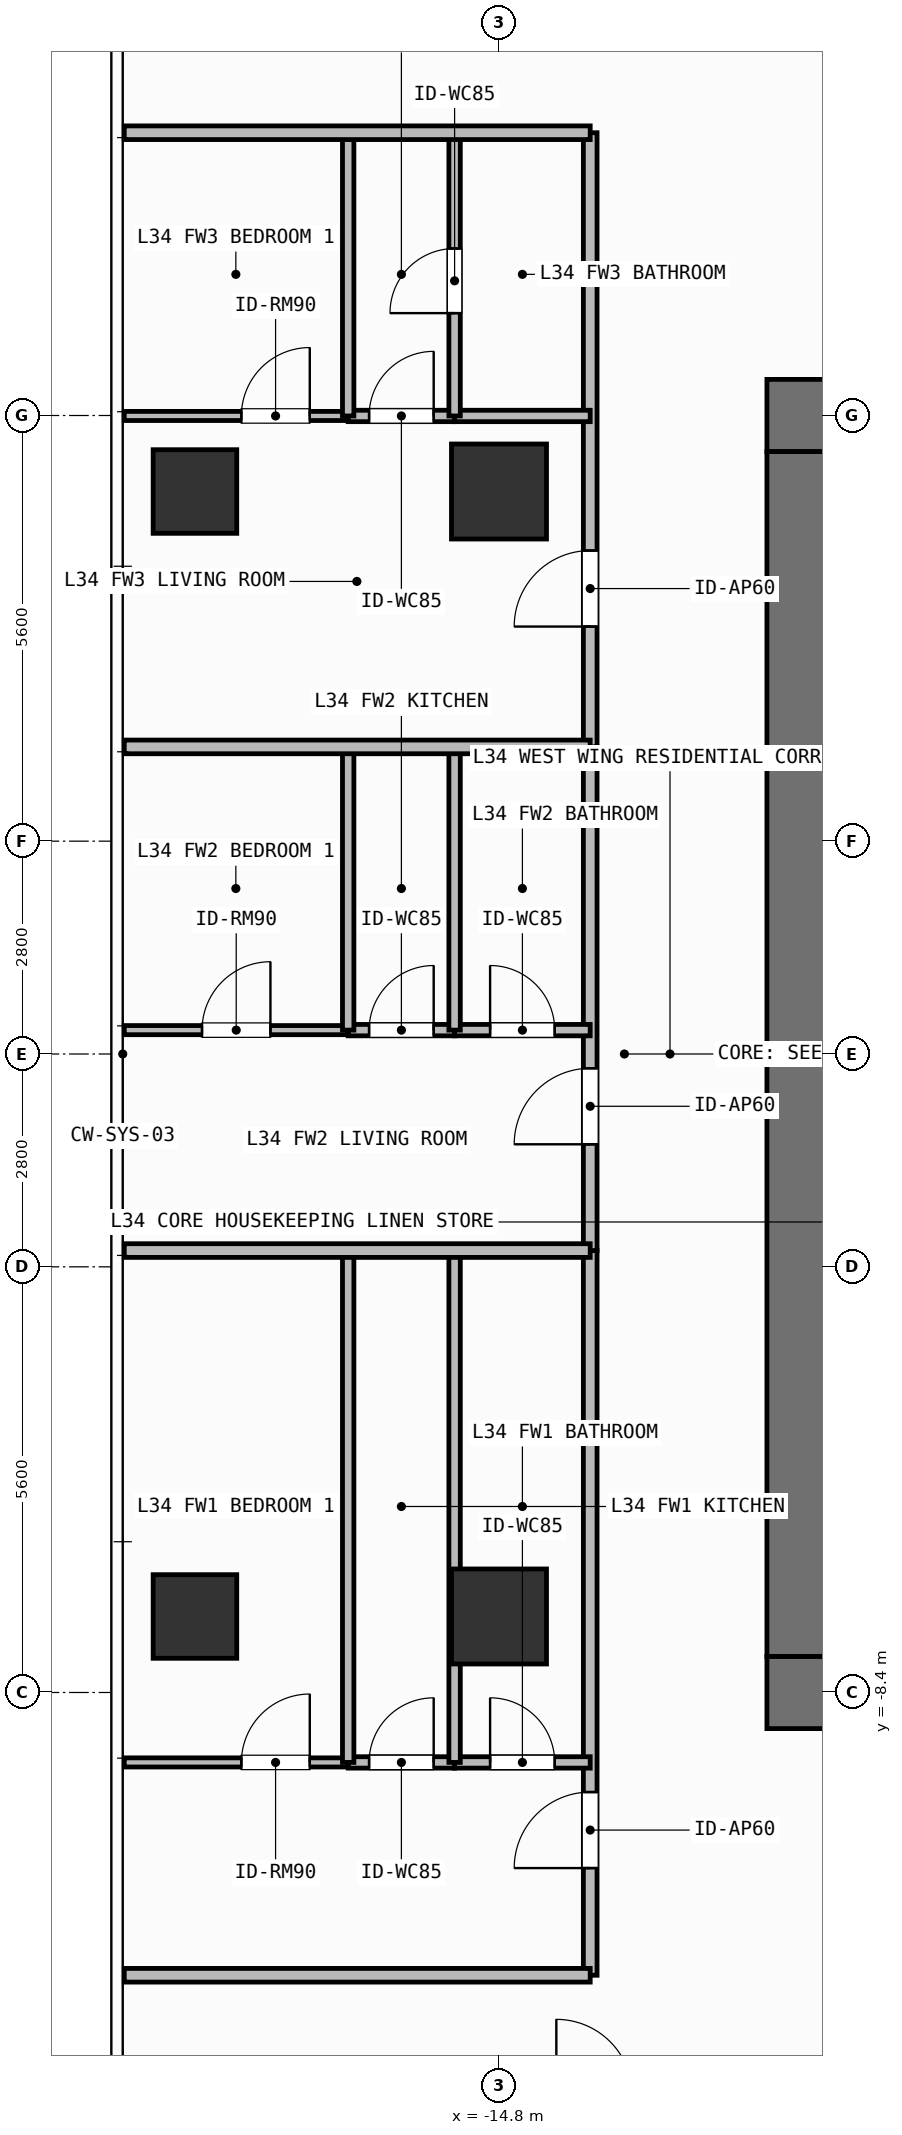
"""IFC4 building model, lengths in metres.
Left out: names, types, materials, properties, quantities, classifications, styles, units other than length and angle.
Written with IfcOpenShell. Run it as: python <this file> out.ifc"""

import sys

from ifc_helpers import new_model, si_unit, direction, frame, frame_2d, origin, origin_2d, place, context, subcontext, project, spatial, rectangle, extrude, element, fill, save


model = new_model("IFC4")
c1 = context("Model", 3, precision=1e-05, world=origin(), true_north=direction((0.0, 1.0)))
c2 = subcontext(c1, "Body", "Model", "MODEL_VIEW")
j1 = project(units=[si_unit("LENGTHUNIT", "METRE"), si_unit("PLANEANGLEUNIT", "RADIAN")], contexts=[c1])
p1 = place(None, origin())
s1 = spatial("IfcSite", under=j1, at=p1, CompositionType="ELEMENT")
p2 = place(p1, origin())
s2 = spatial("IfcBuilding", under=s1, at=p2, CompositionType="ELEMENT")
p3 = place(p2, frame((0.0, 0.0, 136.8)))
s3 = spatial("IfcBuildingStorey", under=s2, at=p3, CompositionType="ELEMENT", Elevation=136.8)
for number, where, z_axis, x_axis in (
    (1, (-11.275, -8.4, 0.0), (0.0, 0.0, 1.0), (1.0, 0.0, 0.0)),
    (2, (-11.275, 8.4, 0.0), (0.0, 0.0, 1.0), (1.0, 0.0, 0.0)),
):
    element("IfcWall", number, at=place(p3, frame(where, z_axis=z_axis, x_axis=x_axis)), inside=s3, PredefinedType="SHEAR", context=c2, shape_type="SweptSolid", body=[
        extrude(rectangle(XDim=1.575, YDim=0.95, at=frame_2d((0.788, 0.0))), origin(), (0.0, 0.0, 1.0), 3.9),
    ])
p4 = place(p3, frame((-10.8, -7.925, 0.0), z_axis=(0.0, 0.0, 1.0), x_axis=(0.0, 1.0, 0.0)))
e3 = element("IfcWall", 3, at=p4, inside=s3, PredefinedType="SHEAR", context=c2, shape_type="SweptSolid", body=[
    extrude(rectangle(XDim=15.85, YDim=0.95, at=frame_2d((7.925, 0.0))), origin(), (0.0, 0.0, 1.0), 3.9),
])
for number, where, z_axis, x_axis in (
    (4, (-14.8, -7.4, 0.0), (0.0, 0.0, 1.0), (1.0, 0.0, 0.0)),
    (5, (-14.8, 7.4, 0.0), (0.0, 0.0, 1.0), (1.0, 0.0, 0.0)),
):
    element("IfcColumn", number, at=place(p3, frame(where, z_axis=z_axis, x_axis=x_axis)), inside=s3, PredefinedType="COLUMN", context=c2, shape_type="SweptSolid", body=[
        extrude(rectangle(XDim=1.25, YDim=1.25, at=origin_2d()), origin(), (0.0, 0.0, 1.0), 3.9),
    ])
for number, where, z_axis, x_axis in (
    (6, (-18.8, -7.4, 0.0), (0.0, 0.0, 1.0), (1.0, 0.0, 0.0)),
    (7, (-18.8, 7.4, 0.0), (0.0, 0.0, 1.0), (1.0, 0.0, 0.0)),
):
    element("IfcColumn", number, at=place(p3, frame(where, z_axis=z_axis, x_axis=x_axis)), inside=s3, PredefinedType="COLUMN", context=c2, shape_type="SweptSolid", body=[
        extrude(rectangle(XDim=1.1, YDim=1.1, at=origin_2d()), origin(), (0.0, 0.0, 1.0), 3.9),
    ])
p5 = place(p3, frame((-13.6, -12.12, 0.0), z_axis=(0.0, 0.0, 1.0), x_axis=(0.0, 1.0, 0.0)))
e8 = element("IfcWall", 8, at=p5, inside=s3, PredefinedType="PARTITIONING", context=c2, shape_type="SweptSolid", body=[
    extrude(rectangle(XDim=9.534, YDim=0.18, at=frame_2d((4.767, 0.0))), origin(), (0.0, 0.0, 1.0), 3.68),
])
p6 = place(p5, frame((1.41, 0.0, 0.0)))
e9 = element("IfcOpeningElement", 9, at=p6, cuts=e8, PredefinedType="OPENING", context=c2, shape_type="SweptSolid", body=[
    extrude(rectangle(XDim=1.0, YDim=2.2, at=frame_2d((0.5, 1.1))), frame((0.0, 0.1, 0.0), z_axis=(0.0, -1.0, 0.0), x_axis=(1.0, 0.0, 0.0)), (0.0, 0.0, 1.0), 0.2),
])
p7 = place(p3, frame((-16.784, -9.32, 0.0), z_axis=(0.0, 0.0, 1.0), x_axis=(1.0, 0.0, 0.0)))
e10 = element("IfcWall", 10, at=p7, inside=s3, PredefinedType="PARTITIONING", context=c2, shape_type="SweptSolid", body=[
    extrude(rectangle(XDim=1.4, YDim=0.15, at=frame_2d((0.7, 0.0))), origin(), (0.0, 0.0, 1.0), 3.68),
])
p8 = place(p7, frame((0.275, 0.0, 0.0)))
e11 = element("IfcOpeningElement", 11, at=p8, cuts=e10, PredefinedType="OPENING", context=c2, shape_type="SweptSolid", body=[
    extrude(rectangle(XDim=0.85, YDim=2.1, at=frame_2d((0.425, 1.05))), frame((0.0, 0.085, 0.0), z_axis=(0.0, -1.0, 0.0), x_axis=(1.0, 0.0, 0.0)), (0.0, 0.0, 1.0), 0.17),
])
p9 = place(p3, frame((-15.384, -9.32, 0.0), z_axis=(0.0, 0.0, 1.0), x_axis=(1.0, 0.0, 0.0)))
e12 = element("IfcWall", 12, at=p9, inside=s3, PredefinedType="PARTITIONING", context=c2, shape_type="SweptSolid", body=[
    extrude(rectangle(XDim=1.784, YDim=0.15, at=frame_2d((0.892, 0.0))), origin(), (0.0, 0.0, 1.0), 3.68),
])
p10 = place(p9, frame((0.467, 0.0, 0.0)))
e13 = element("IfcOpeningElement", 13, at=p10, cuts=e12, PredefinedType="OPENING", context=c2, shape_type="SweptSolid", body=[
    extrude(rectangle(XDim=0.85, YDim=2.1, at=frame_2d((0.425, 1.05))), frame((0.0, 0.085, 0.0), z_axis=(0.0, -1.0, 0.0), x_axis=(1.0, 0.0, 0.0)), (0.0, 0.0, 1.0), 0.17),
])
p11 = place(p3, frame((-19.73, -9.32, 0.0), z_axis=(0.0, 0.0, 1.0), x_axis=(1.0, 0.0, 0.0)))
e14 = element("IfcWall", 14, at=p11, inside=s3, PredefinedType="PARTITIONING", context=c2, shape_type="SweptSolid", body=[
    extrude(rectangle(XDim=2.946, YDim=0.12, at=frame_2d((1.473, 0.0))), origin(), (0.0, 0.0, 1.0), 3.68),
])
p12 = place(p11, frame((1.541, 0.0, 0.0)))
e15 = element("IfcOpeningElement", 15, at=p12, cuts=e14, PredefinedType="OPENING", context=c2, shape_type="SweptSolid", body=[
    extrude(rectangle(XDim=0.9, YDim=2.1, at=frame_2d((0.45, 1.05))), frame((0.0, 0.07, 0.0), z_axis=(0.0, -1.0, 0.0), x_axis=(1.0, 0.0, 0.0)), (0.0, 0.0, 1.0), 0.14),
])
p13 = place(p3, frame((-13.6, -2.586, 0.0), z_axis=(0.0, 0.0, 1.0), x_axis=(0.0, 1.0, 0.0)))
e16 = element("IfcWall", 16, at=p13, inside=s3, PredefinedType="PARTITIONING", context=c2, shape_type="SweptSolid", body=[
    extrude(rectangle(XDim=6.626, YDim=0.18, at=frame_2d((3.313, 0.0))), origin(), (0.0, 0.0, 1.0), 3.68),
])
p14 = place(p13, frame((1.398, 0.0, 0.0)))
e17 = element("IfcOpeningElement", 17, at=p14, cuts=e16, PredefinedType="OPENING", context=c2, shape_type="SweptSolid", body=[
    extrude(rectangle(XDim=1.0, YDim=2.2, at=frame_2d((0.5, 1.1))), frame((0.0, 0.1, 0.0), z_axis=(0.0, -1.0, 0.0), x_axis=(1.0, 0.0, 0.0)), (0.0, 0.0, 1.0), 0.2),
])
p15 = place(p3, frame((-16.784, 0.314, 0.0), z_axis=(0.0, 0.0, 1.0), x_axis=(1.0, 0.0, 0.0)))
e18 = element("IfcWall", 18, at=p15, inside=s3, PredefinedType="PARTITIONING", context=c2, shape_type="SweptSolid", body=[
    extrude(rectangle(XDim=1.4, YDim=0.15, at=frame_2d((0.7, 0.0))), origin(), (0.0, 0.0, 1.0), 3.68),
])
p16 = place(p15, frame((0.275, 0.0, 0.0)))
e19 = element("IfcOpeningElement", 19, at=p16, cuts=e18, PredefinedType="OPENING", context=c2, shape_type="SweptSolid", body=[
    extrude(rectangle(XDim=0.85, YDim=2.1, at=frame_2d((0.425, 1.05))), frame((0.0, 0.085, 0.0), z_axis=(0.0, -1.0, 0.0), x_axis=(1.0, 0.0, 0.0)), (0.0, 0.0, 1.0), 0.17),
])
p17 = place(p3, frame((-15.384, 0.314, 0.0), z_axis=(0.0, 0.0, 1.0), x_axis=(1.0, 0.0, 0.0)))
e20 = element("IfcWall", 20, at=p17, inside=s3, PredefinedType="PARTITIONING", context=c2, shape_type="SweptSolid", body=[
    extrude(rectangle(XDim=1.784, YDim=0.15, at=frame_2d((0.892, 0.0))), origin(), (0.0, 0.0, 1.0), 3.68),
])
p18 = place(p17, frame((0.467, 0.0, 0.0)))
e21 = element("IfcOpeningElement", 21, at=p18, cuts=e20, PredefinedType="OPENING", context=c2, shape_type="SweptSolid", body=[
    extrude(rectangle(XDim=0.85, YDim=2.1, at=frame_2d((0.425, 1.05))), frame((0.0, 0.085, 0.0), z_axis=(0.0, -1.0, 0.0), x_axis=(1.0, 0.0, 0.0)), (0.0, 0.0, 1.0), 0.17),
])
p19 = place(p3, frame((-19.73, 0.314, 0.0), z_axis=(0.0, 0.0, 1.0), x_axis=(1.0, 0.0, 0.0)))
e22 = element("IfcWall", 22, at=p19, inside=s3, PredefinedType="PARTITIONING", context=c2, shape_type="SweptSolid", body=[
    extrude(rectangle(XDim=2.946, YDim=0.12, at=frame_2d((1.473, 0.0))), origin(), (0.0, 0.0, 1.0), 3.68),
])
p20 = place(p19, frame((1.023, 0.0, 0.0)))
e23 = element("IfcOpeningElement", 23, at=p20, cuts=e22, PredefinedType="OPENING", context=c2, shape_type="SweptSolid", body=[
    extrude(rectangle(XDim=0.9, YDim=2.1, at=frame_2d((0.45, 1.05))), frame((0.0, 0.07, 0.0), z_axis=(0.0, -1.0, 0.0), x_axis=(1.0, 0.0, 0.0)), (0.0, 0.0, 1.0), 0.14),
])
p21 = place(p3, frame((-13.6, 4.04, 0.0), z_axis=(0.0, 0.0, 1.0), x_axis=(0.0, 1.0, 0.0)))
e24 = element("IfcWall", 24, at=p21, inside=s3, PredefinedType="PARTITIONING", context=c2, shape_type="SweptSolid", body=[
    extrude(rectangle(XDim=8.08, YDim=0.18, at=frame_2d((4.04, 0.0))), origin(), (0.0, 0.0, 1.0), 3.68),
])
p22 = place(p21, frame((1.583, 0.0, 0.0)))
e25 = element("IfcOpeningElement", 25, at=p22, cuts=e24, PredefinedType="OPENING", context=c2, shape_type="SweptSolid", body=[
    extrude(rectangle(XDim=1.0, YDim=2.2, at=frame_2d((0.5, 1.1))), frame((0.0, 0.1, 0.0), z_axis=(0.0, -1.0, 0.0), x_axis=(1.0, 0.0, 0.0)), (0.0, 0.0, 1.0), 0.2),
])
p23 = place(p3, frame((-16.784, 8.394, 0.0), z_axis=(0.0, 0.0, 1.0), x_axis=(1.0, 0.0, 0.0)))
e26 = element("IfcWall", 26, at=p23, inside=s3, PredefinedType="PARTITIONING", context=c2, shape_type="SweptSolid", body=[
    extrude(rectangle(XDim=1.4, YDim=0.15, at=frame_2d((0.7, 0.0))), origin(), (0.0, 0.0, 1.0), 3.68),
])
p24 = place(p23, frame((0.275, 0.0, 0.0)))
e27 = element("IfcOpeningElement", 27, at=p24, cuts=e26, PredefinedType="OPENING", context=c2, shape_type="SweptSolid", body=[
    extrude(rectangle(XDim=0.85, YDim=2.1, at=frame_2d((0.425, 1.05))), frame((0.0, 0.085, 0.0), z_axis=(0.0, -1.0, 0.0), x_axis=(1.0, 0.0, 0.0)), (0.0, 0.0, 1.0), 0.17),
])
p25 = place(p3, frame((-15.384, 8.394, 0.0), z_axis=(0.0, 0.0, 1.0), x_axis=(1.0, 0.0, 0.0)))
e28 = element("IfcWall", 28, at=p25, inside=s3, PredefinedType="PARTITIONING", context=c2, shape_type="SweptSolid", body=[
    extrude(rectangle(XDim=1.784, YDim=0.15, at=frame_2d((0.892, 0.0))), origin(), (0.0, 0.0, 1.0), 3.68),
])
p26 = place(p3, frame((-19.73, 8.394, 0.0), z_axis=(0.0, 0.0, 1.0), x_axis=(1.0, 0.0, 0.0)))
e29 = element("IfcWall", 29, at=p26, inside=s3, PredefinedType="PARTITIONING", context=c2, shape_type="SweptSolid", body=[
    extrude(rectangle(XDim=2.946, YDim=0.12, at=frame_2d((1.473, 0.0))), origin(), (0.0, 0.0, 1.0), 3.68),
])
p27 = place(p26, frame((1.541, 0.0, 0.0)))
e30 = element("IfcOpeningElement", 30, at=p27, cuts=e29, PredefinedType="OPENING", context=c2, shape_type="SweptSolid", body=[
    extrude(rectangle(XDim=0.9, YDim=2.1, at=frame_2d((0.45, 1.05))), frame((0.0, 0.07, 0.0), z_axis=(0.0, -1.0, 0.0), x_axis=(1.0, 0.0, 0.0)), (0.0, 0.0, 1.0), 0.14),
])
for number, where, z_axis, x_axis in (
    (31, (-15.384, -9.32, 0.0), (0.0, 0.0, 1.0), (0.0, 1.0, 0.0)),
    (32, (-16.784, -9.32, 0.0), (0.0, 0.0, 1.0), (0.0, 1.0, 0.0)),
):
    element("IfcWall", number, at=place(p3, frame(where, z_axis=z_axis, x_axis=x_axis)), inside=s3, PredefinedType="PARTITIONING", context=c2, shape_type="SweptSolid", body=[
        extrude(rectangle(XDim=6.734, YDim=0.15, at=frame_2d((3.367, 0.0))), origin(), (0.0, 0.0, 1.0), 3.68),
    ])
for number, where, z_axis, x_axis in (
    (33, (-15.384, 0.314, 0.0), (0.0, 0.0, 1.0), (0.0, 1.0, 0.0)),
    (34, (-16.784, 0.314, 0.0), (0.0, 0.0, 1.0), (0.0, 1.0, 0.0)),
):
    element("IfcWall", number, at=place(p3, frame(where, z_axis=z_axis, x_axis=x_axis)), inside=s3, PredefinedType="PARTITIONING", context=c2, shape_type="SweptSolid", body=[
        extrude(rectangle(XDim=3.726, YDim=0.15, at=frame_2d((1.863, 0.0))), origin(), (0.0, 0.0, 1.0), 3.68),
    ])
p28 = place(p3, frame((-19.73, -2.586, 0.0), z_axis=(0.0, 0.0, 1.0), x_axis=(1.0, 0.0, 0.0)))
e35 = element("IfcWall", 35, at=p28, inside=s3, PredefinedType="PARTITIONING", context=c2, shape_type="SweptSolid", body=[
    extrude(rectangle(XDim=6.13, YDim=0.18, at=frame_2d((3.065, 0.0))), origin(), (0.0, 0.0, 1.0), 3.68),
])
p29 = place(p3, frame((-15.384, 8.394, 0.0), z_axis=(0.0, 0.0, 1.0), x_axis=(0.0, 1.0, 0.0)))
e36 = element("IfcWall", 36, at=p29, inside=s3, PredefinedType="PARTITIONING", context=c2, shape_type="SweptSolid", body=[
    extrude(rectangle(XDim=3.726, YDim=0.15, at=frame_2d((1.863, 0.0))), origin(), (0.0, 0.0, 1.0), 3.68),
])
p30 = place(p29, frame((1.353, 0.0, 0.0)))
e37 = element("IfcOpeningElement", 37, at=p30, cuts=e36, PredefinedType="OPENING", context=c2, shape_type="SweptSolid", body=[
    extrude(rectangle(XDim=0.85, YDim=2.1, at=frame_2d((0.425, 1.05))), frame((0.0, 0.085, 0.0), z_axis=(0.0, -1.0, 0.0), x_axis=(1.0, 0.0, 0.0)), (0.0, 0.0, 1.0), 0.17),
])
p31 = place(p3, frame((-16.784, 8.394, 0.0), z_axis=(0.0, 0.0, 1.0), x_axis=(0.0, 1.0, 0.0)))
e38 = element("IfcWall", 38, at=p31, inside=s3, PredefinedType="PARTITIONING", context=c2, shape_type="SweptSolid", body=[
    extrude(rectangle(XDim=3.726, YDim=0.15, at=frame_2d((1.863, 0.0))), origin(), (0.0, 0.0, 1.0), 3.68),
])
for number, where, z_axis, x_axis in (
    (39, (-19.73, 4.04, 0.0), (0.0, 0.0, 1.0), (1.0, 0.0, 0.0)),
    (40, (-19.73, -12.12, 0.0), (0.0, 0.0, 1.0), (1.0, 0.0, 0.0)),
    (41, (-19.73, 12.12, 0.0), (0.0, 0.0, 1.0), (1.0, 0.0, 0.0)),
):
    element("IfcWall", number, at=place(p3, frame(where, z_axis=z_axis, x_axis=x_axis)), inside=s3, PredefinedType="PARTITIONING", context=c2, shape_type="SweptSolid", body=[
        extrude(rectangle(XDim=6.13, YDim=0.18, at=frame_2d((3.065, 0.0))), origin(), (0.0, 0.0, 1.0), 3.68),
    ])
p32 = place(p6, origin())
e42 = element("IfcDoor", 42, at=p32, inside=s3, OperationType="SINGLE_SWING_LEFT", PredefinedType="DOOR", context=c2, shape_type="SweptSolid", body=[
    extrude(rectangle(XDim=1.0, YDim=2.2, at=frame_2d((0.5, 1.1))), frame((0.0, 0.025, 0.0), z_axis=(0.0, -1.0, 0.0), x_axis=(1.0, 0.0, 0.0)), (0.0, 0.0, 1.0), 0.05),
])
fill(e9, e42)
p33 = place(p8, origin())
e43 = element("IfcDoor", 43, at=p33, inside=s3, OperationType="SINGLE_SWING_RIGHT", PredefinedType="DOOR", context=c2, shape_type="SweptSolid", body=[
    extrude(rectangle(XDim=0.85, YDim=2.1, at=frame_2d((0.425, 1.05))), frame((0.0, 0.025, 0.0), z_axis=(0.0, -1.0, 0.0), x_axis=(1.0, 0.0, 0.0)), (0.0, 0.0, 1.0), 0.05),
])
fill(e11, e43)
p34 = place(p10, origin())
e44 = element("IfcDoor", 44, at=p34, inside=s3, OperationType="SINGLE_SWING_LEFT", PredefinedType="DOOR", context=c2, shape_type="SweptSolid", body=[
    extrude(rectangle(XDim=0.85, YDim=2.1, at=frame_2d((0.425, 1.05))), frame((0.0, 0.025, 0.0), z_axis=(0.0, -1.0, 0.0), x_axis=(1.0, 0.0, 0.0)), (0.0, 0.0, 1.0), 0.05),
])
fill(e13, e44)
p35 = place(p12, origin())
e45 = element("IfcDoor", 45, at=p35, inside=s3, OperationType="SINGLE_SWING_RIGHT", PredefinedType="DOOR", context=c2, shape_type="SweptSolid", body=[
    extrude(rectangle(XDim=0.9, YDim=2.1, at=frame_2d((0.45, 1.05))), frame((0.0, 0.025, 0.0), z_axis=(0.0, -1.0, 0.0), x_axis=(1.0, 0.0, 0.0)), (0.0, 0.0, 1.0), 0.05),
])
fill(e15, e45)
p36 = place(p14, origin())
e46 = element("IfcDoor", 46, at=p36, inside=s3, OperationType="SINGLE_SWING_LEFT", PredefinedType="DOOR", context=c2, shape_type="SweptSolid", body=[
    extrude(rectangle(XDim=1.0, YDim=2.2, at=frame_2d((0.5, 1.1))), frame((0.0, 0.025, 0.0), z_axis=(0.0, -1.0, 0.0), x_axis=(1.0, 0.0, 0.0)), (0.0, 0.0, 1.0), 0.05),
])
fill(e17, e46)
p37 = place(p16, origin())
e47 = element("IfcDoor", 47, at=p37, inside=s3, OperationType="SINGLE_SWING_RIGHT", PredefinedType="DOOR", context=c2, shape_type="SweptSolid", body=[
    extrude(rectangle(XDim=0.85, YDim=2.1, at=frame_2d((0.425, 1.05))), frame((0.0, 0.025, 0.0), z_axis=(0.0, -1.0, 0.0), x_axis=(1.0, 0.0, 0.0)), (0.0, 0.0, 1.0), 0.05),
])
fill(e19, e47)
p38 = place(p18, origin())
e48 = element("IfcDoor", 48, at=p38, inside=s3, OperationType="SINGLE_SWING_LEFT", PredefinedType="DOOR", context=c2, shape_type="SweptSolid", body=[
    extrude(rectangle(XDim=0.85, YDim=2.1, at=frame_2d((0.425, 1.05))), frame((0.0, 0.025, 0.0), z_axis=(0.0, -1.0, 0.0), x_axis=(1.0, 0.0, 0.0)), (0.0, 0.0, 1.0), 0.05),
])
fill(e21, e48)
p39 = place(p20, origin())
e49 = element("IfcDoor", 49, at=p39, inside=s3, OperationType="SINGLE_SWING_RIGHT", PredefinedType="DOOR", context=c2, shape_type="SweptSolid", body=[
    extrude(rectangle(XDim=0.9, YDim=2.1, at=frame_2d((0.45, 1.05))), frame((0.0, 0.025, 0.0), z_axis=(0.0, -1.0, 0.0), x_axis=(1.0, 0.0, 0.0)), (0.0, 0.0, 1.0), 0.05),
])
fill(e23, e49)
p40 = place(p22, origin())
e50 = element("IfcDoor", 50, at=p40, inside=s3, OperationType="SINGLE_SWING_LEFT", PredefinedType="DOOR", context=c2, shape_type="SweptSolid", body=[
    extrude(rectangle(XDim=1.0, YDim=2.2, at=frame_2d((0.5, 1.1))), frame((0.0, 0.025, 0.0), z_axis=(0.0, -1.0, 0.0), x_axis=(1.0, 0.0, 0.0)), (0.0, 0.0, 1.0), 0.05),
])
fill(e25, e50)
p41 = place(p24, origin())
e51 = element("IfcDoor", 51, at=p41, inside=s3, OperationType="SINGLE_SWING_RIGHT", PredefinedType="DOOR", context=c2, shape_type="SweptSolid", body=[
    extrude(rectangle(XDim=0.85, YDim=2.1, at=frame_2d((0.425, 1.05))), frame((0.0, 0.025, 0.0), z_axis=(0.0, -1.0, 0.0), x_axis=(1.0, 0.0, 0.0)), (0.0, 0.0, 1.0), 0.05),
])
fill(e27, e51)
p42 = place(p30, origin())
e52 = element("IfcDoor", 52, at=p42, inside=s3, OperationType="SINGLE_SWING_LEFT", PredefinedType="DOOR", context=c2, shape_type="SweptSolid", body=[
    extrude(rectangle(XDim=0.85, YDim=2.1, at=frame_2d((0.425, 1.05))), frame((0.0, 0.025, 0.0), z_axis=(0.0, -1.0, 0.0), x_axis=(1.0, 0.0, 0.0)), (0.0, 0.0, 1.0), 0.05),
])
fill(e37, e52)
p43 = place(p27, origin())
e53 = element("IfcDoor", 53, at=p43, inside=s3, OperationType="SINGLE_SWING_RIGHT", PredefinedType="DOOR", context=c2, shape_type="SweptSolid", body=[
    extrude(rectangle(XDim=0.9, YDim=2.1, at=frame_2d((0.45, 1.05))), frame((0.0, 0.025, 0.0), z_axis=(0.0, -1.0, 0.0), x_axis=(1.0, 0.0, 0.0)), (0.0, 0.0, 1.0), 0.05),
])
fill(e30, e53)
save(model, sys.argv[1])
